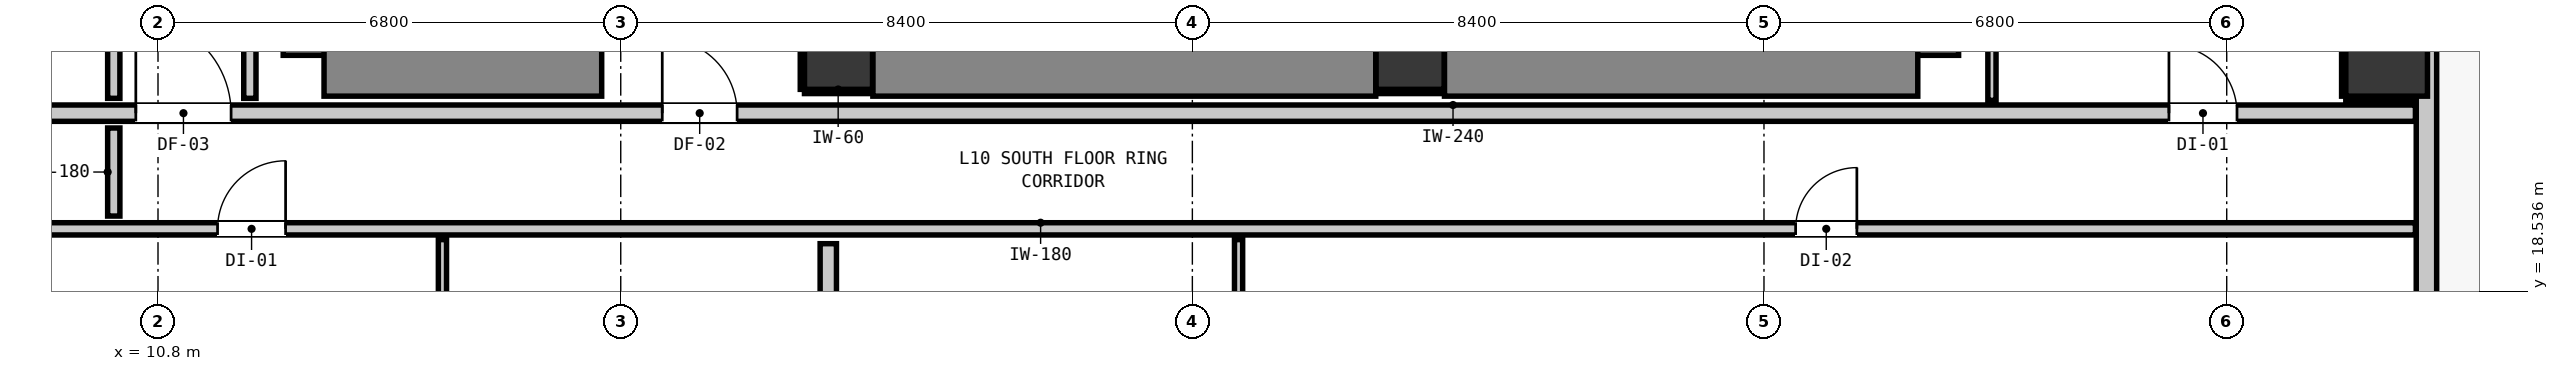
"""IFC4 building model, lengths in metres.
Left out: names, types, materials, properties, quantities, classifications, styles, units other than length and angle.
Written with IfcOpenShell. Run it as: python <this file> out.ifc"""

import sys

from ifc_helpers import new_model, si_unit, direction, frame, frame_2d, origin, origin_2d, place, context, subcontext, project, spatial, rectangle, extrude, element, fill, save


model = new_model("IFC4")
c1 = context("Model", 3, precision=1e-05, world=origin(), true_north=direction((0.0, 1.0)))
c2 = subcontext(c1, "Body", "Model", "MODEL_VIEW")
j1 = project(units=[si_unit("LENGTHUNIT", "METRE"), si_unit("PLANEANGLEUNIT", "RADIAN")], contexts=[c1])
p1 = place(None, origin())
s1 = spatial("IfcSite", under=j1, at=p1, CompositionType="ELEMENT")
p2 = place(p1, origin())
s2 = spatial("IfcBuilding", under=s1, at=p2, CompositionType="ELEMENT")
p3 = place(p2, frame((0.0, 0.0, 38.6)))
s3 = spatial("IfcBuildingStorey", under=s2, at=p3, CompositionType="ELEMENT", Elevation=38.6)
for number, where, z_axis, x_axis in (
    (1, (20.8, 22.0, 0.0), (0.0, 0.0, 1.0), (1.0, 0.0, 0.0)),
    (2, (29.2, 22.0, 0.0), (0.0, 0.0, 1.0), (1.0, 0.0, 0.0)),
):
    element("IfcColumn", number, at=place(p3, frame(where, z_axis=z_axis, x_axis=x_axis)), inside=s3, PredefinedType="COLUMN", context=c2, shape_type="SweptSolid", body=[
        extrude(rectangle(XDim=1.0, YDim=1.0, at=origin_2d()), origin(), (0.0, 0.0, 1.0), 3.32),
    ])
p4 = place(p3, frame((13.24, 22.0, 0.0), z_axis=(0.0, 0.0, 1.0), x_axis=(0.0, 1.0, 0.0)))
e3 = element("IfcWall", 3, at=p4, inside=s3, PredefinedType="SHEAR", context=c2, shape_type="SweptSolid", body=[
    extrude(rectangle(XDim=8.195, YDim=1.2, at=frame_2d((4.098, 0.0))), origin(), (0.0, 0.0, 1.0), 3.32),
])
p5 = place(p3, frame((13.24, 22.0, 0.0), z_axis=(0.0, 0.0, 1.0), x_axis=(1.0, 0.0, 0.0)))
e4 = element("IfcWall", 4, at=p5, inside=s3, PredefinedType="SHEAR", context=c2, shape_type="SweptSolid", body=[
    extrude(rectangle(XDim=4.08, YDim=1.2, at=frame_2d((2.04, 0.0))), origin(), (0.0, 0.0, 1.0), 3.32),
])
p6 = place(p3, frame((36.66, 22.0, 0.0), z_axis=(0.0, 0.0, 1.0), x_axis=(0.0, 1.0, 0.0)))
e5 = element("IfcWall", 5, at=p6, inside=s3, PredefinedType="SHEAR", context=c2, shape_type="SweptSolid", body=[
    extrude(rectangle(XDim=8.195, YDim=1.2, at=frame_2d((4.098, 0.0))), origin(), (0.0, 0.0, 1.0), 3.32),
])
p7 = place(p3, frame((29.705, 22.0, 0.0), z_axis=(0.0, 0.0, 1.0), x_axis=(1.0, 0.0, 0.0)))
e6 = element("IfcWall", 6, at=p7, inside=s3, PredefinedType="SHEAR", context=c2, shape_type="SweptSolid", body=[
    extrude(rectangle(XDim=6.955, YDim=1.2, at=frame_2d((3.478, 0.0))), origin(), (0.0, 0.0, 1.0), 3.32),
])
p8 = place(p3, frame((21.305, 22.0, 0.0), z_axis=(0.0, 0.0, 1.0), x_axis=(1.0, 0.0, 0.0)))
e7 = element("IfcWall", 7, at=p8, inside=s3, PredefinedType="SHEAR", context=c2, shape_type="SweptSolid", body=[
    extrude(rectangle(XDim=7.39, YDim=1.2, at=frame_2d((3.695, 0.0))), origin(), (0.0, 0.0, 1.0), 3.32),
])
p9 = place(p3, frame((43.55, 22.0, 0.0), z_axis=(0.0, 0.0, 1.0), x_axis=(1.0, 0.0, 0.0)))
e8 = element("IfcColumn", 8, at=p9, inside=s3, PredefinedType="COLUMN", context=c2, shape_type="SweptSolid", body=[
    extrude(rectangle(XDim=1.2, YDim=1.2, at=origin_2d()), origin(), (0.0, 0.0, 1.0), 2.9),
])
p10 = place(p3, frame((44.135, 44.835, 0.0), z_axis=(0.0, 0.0, 1.0), x_axis=(0.0, -1.0, 0.0)))
e9 = element("IfcWall", 9, at=p10, inside=s3, PredefinedType="STANDARD", context=c2, shape_type="SweptSolid", body=[
    extrude(rectangle(XDim=34.67, YDim=0.3, at=frame_2d((17.335, 0.0))), origin(), (0.0, 0.0, 1.0), 2.9),
])
p11 = place(p10, frame((1.251, 0.0, 0.0)))
e10 = element("IfcOpeningElement", 10, at=p11, cuts=e9, PredefinedType="OPENING", context=c2, shape_type="SweptSolid", body=[
    extrude(rectangle(XDim=1.0, YDim=2.15, at=frame_2d((0.5, 1.075))), frame((0.0, 0.16, 0.0), z_axis=(0.0, -1.0, 0.0), x_axis=(1.0, 0.0, 0.0)), (0.0, 0.0, 1.0), 0.32),
])
p12 = place(p10, frame((29.508, 0.0, 0.85)))
e11 = element("IfcOpeningElement", 11, at=p12, cuts=e9, PredefinedType="OPENING", context=c2, shape_type="SweptSolid", body=[
    extrude(rectangle(XDim=1.05, YDim=1.65, at=frame_2d((0.525, 0.825))), frame((0.0, 0.16, 0.0), z_axis=(0.0, -1.0, 0.0), x_axis=(1.0, 0.0, 0.0)), (0.0, 0.0, 1.0), 0.32),
])
p13 = place(p10, frame((19.619, 0.0, 0.85)))
e12 = element("IfcOpeningElement", 12, at=p13, cuts=e9, PredefinedType="OPENING", context=c2, shape_type="SweptSolid", body=[
    extrude(rectangle(XDim=1.05, YDim=1.65, at=frame_2d((0.525, 0.825))), frame((0.0, 0.16, 0.0), z_axis=(0.0, -1.0, 0.0), x_axis=(1.0, 0.0, 0.0)), (0.0, 0.0, 1.0), 0.32),
])
p14 = place(p3, frame((1.827, 21.15, 0.0), z_axis=(0.0, 0.0, 1.0), x_axis=(1.0, 0.0, 0.0)))
e13 = element("IfcWall", 13, at=p14, inside=s3, PredefinedType="PARTITIONING", context=c2, shape_type="SweptSolid", body=[
    extrude(rectangle(XDim=42.146, YDim=0.24, at=frame_2d((21.073, 0.0))), origin(), (0.0, 0.0, 1.0), 2.9),
])
p15 = place(p14, frame((16.383, 0.0, 0.0)))
e14 = element("IfcOpeningElement", 14, at=p15, cuts=e13, PredefinedType="OPENING", context=c2, shape_type="SweptSolid", body=[
    extrude(rectangle(XDim=1.1, YDim=2.15, at=frame_2d((0.55, 1.075))), frame((0.0, 0.13, 0.0), z_axis=(0.0, -1.0, 0.0), x_axis=(1.0, 0.0, 0.0)), (0.0, 0.0, 1.0), 0.26),
])
p16 = place(p14, frame((8.647, 0.0, 0.0)))
e15 = element("IfcOpeningElement", 15, at=p16, cuts=e13, PredefinedType="OPENING", context=c2, shape_type="SweptSolid", body=[
    extrude(rectangle(XDim=1.4, YDim=2.15, at=frame_2d((0.7, 1.075))), frame((0.0, 0.13, 0.0), z_axis=(0.0, -1.0, 0.0), x_axis=(1.0, 0.0, 0.0)), (0.0, 0.0, 1.0), 0.26),
])
p17 = place(p14, frame((38.524, 0.0, 0.0)))
e16 = element("IfcOpeningElement", 16, at=p17, cuts=e13, PredefinedType="OPENING", context=c2, shape_type="SweptSolid", body=[
    extrude(rectangle(XDim=1.0, YDim=2.15, at=frame_2d((0.5, 1.075))), frame((0.0, 0.13, 0.0), z_axis=(0.0, -1.0, 0.0), x_axis=(1.0, 0.0, 0.0)), (0.0, 0.0, 1.0), 0.26),
])
p18 = place(p3, frame((1.827, 19.45, 0.0), z_axis=(0.0, 0.0, 1.0), x_axis=(1.0, 0.0, 0.0)))
e17 = element("IfcWall", 17, at=p18, inside=s3, PredefinedType="PARTITIONING", context=c2, shape_type="SweptSolid", body=[
    extrude(rectangle(XDim=42.146, YDim=0.18, at=frame_2d((21.073, 0.0))), origin(), (0.0, 0.0, 1.0), 2.9),
])
p19 = place(p18, frame((9.848, 0.0, 0.0)))
e18 = element("IfcOpeningElement", 18, at=p19, cuts=e17, PredefinedType="OPENING", context=c2, shape_type="SweptSolid", body=[
    extrude(rectangle(XDim=1.0, YDim=2.15, at=frame_2d((0.5, 1.075))), frame((0.0, 0.1, 0.0), z_axis=(0.0, -1.0, 0.0), x_axis=(1.0, 0.0, 0.0)), (0.0, 0.0, 1.0), 0.2),
])
p20 = place(p18, frame((33.038, 0.0, 0.0)))
e19 = element("IfcOpeningElement", 19, at=p20, cuts=e17, PredefinedType="OPENING", context=c2, shape_type="SweptSolid", body=[
    extrude(rectangle(XDim=0.9, YDim=2.1, at=frame_2d((0.45, 1.05))), frame((0.0, 0.1, 0.0), z_axis=(0.0, -1.0, 0.0), x_axis=(1.0, 0.0, 0.0)), (0.0, 0.0, 1.0), 0.2),
])
p21 = place(p3, frame((20.65, 13.198, 0.0), z_axis=(0.0, 0.0, 1.0), x_axis=(0.0, 1.0, 0.0)))
e20 = element("IfcWall", 20, at=p21, inside=s3, PredefinedType="PARTITIONING", context=c2, shape_type="SweptSolid", body=[
    extrude(rectangle(XDim=6.034, YDim=0.24, at=frame_2d((3.017, 0.0))), origin(), (0.0, 0.0, 1.0), 0.905),
])
p22 = place(p3, frame((10.15, 19.638, 0.0), z_axis=(0.0, 0.0, 1.0), x_axis=(0.0, 1.0, 0.0)))
e21 = element("IfcWall", 21, at=p22, inside=s3, PredefinedType="PARTITIONING", context=c2, shape_type="SweptSolid", body=[
    extrude(rectangle(XDim=1.294, YDim=0.18, at=frame_2d((0.647, 0.0))), origin(), (0.0, 0.0, 1.0), 2.9),
])
p23 = place(p3, frame((10.15, 21.368, 0.0), z_axis=(0.0, 0.0, 1.0), x_axis=(0.0, 1.0, 0.0)))
e22 = element("IfcWall", 22, at=p23, inside=s3, PredefinedType="PARTITIONING", context=c2, shape_type="SweptSolid", body=[
    extrude(rectangle(XDim=11.874, YDim=0.18, at=frame_2d((5.937, 0.0))), origin(), (0.0, 0.0, 1.0), 2.9),
])
p24 = place(p23, frame((5.481, 0.0, 0.0)))
e23 = element("IfcOpeningElement", 23, at=p24, cuts=e22, PredefinedType="OPENING", context=c2, shape_type="SweptSolid", body=[
    extrude(rectangle(XDim=0.9, YDim=2.1, at=frame_2d((0.45, 1.05))), frame((0.0, 0.1, 0.0), z_axis=(0.0, -1.0, 0.0), x_axis=(1.0, 0.0, 0.0)), (0.0, 0.0, 1.0), 0.2),
])
p25 = place(p3, frame((12.15, 21.368, 0.0), z_axis=(0.0, 0.0, 1.0), x_axis=(0.0, 1.0, 0.0)))
e24 = element("IfcWall", 24, at=p25, inside=s3, PredefinedType="PARTITIONING", context=c2, shape_type="SweptSolid", body=[
    extrude(rectangle(XDim=18.694, YDim=0.18, at=frame_2d((9.347, 0.0))), origin(), (0.0, 0.0, 1.0), 2.9),
])
p26 = place(p3, frame((14.98, 13.138, 0.0), z_axis=(0.0, 0.0, 1.0), x_axis=(0.0, 1.0, 0.0)))
e25 = element("IfcWall", 25, at=p26, inside=s3, PredefinedType="PARTITIONING", context=c2, shape_type="SweptSolid", body=[
    extrude(rectangle(XDim=6.154, YDim=0.12, at=frame_2d((3.077, 0.0))), origin(), (0.0, 0.0, 1.0), 2.9),
])
p27 = place(p26, frame((2.637, 0.0, 0.0)))
e26 = element("IfcOpeningElement", 26, at=p27, cuts=e25, PredefinedType="OPENING", context=c2, shape_type="SweptSolid", body=[
    extrude(rectangle(XDim=0.9, YDim=2.1, at=frame_2d((0.45, 1.05))), frame((0.0, 0.07, 0.0), z_axis=(0.0, -1.0, 0.0), x_axis=(1.0, 0.0, 0.0)), (0.0, 0.0, 1.0), 0.14),
])
p28 = place(p3, frame((26.679, 13.138, 0.0), z_axis=(0.0, 0.0, 1.0), x_axis=(0.0, 1.0, 0.0)))
e27 = element("IfcWall", 27, at=p28, inside=s3, PredefinedType="PARTITIONING", context=c2, shape_type="SweptSolid", body=[
    extrude(rectangle(XDim=6.154, YDim=0.12, at=frame_2d((3.077, 0.0))), origin(), (0.0, 0.0, 1.0), 2.9),
])
p29 = place(p3, frame((37.75, 21.338, 0.0), z_axis=(0.0, 0.0, 1.0), x_axis=(0.0, 1.0, 0.0)))
e28 = element("IfcWall", 28, at=p29, inside=s3, PredefinedType="PARTITIONING", context=c2, shape_type="SweptSolid", body=[
    extrude(rectangle(XDim=5.316, YDim=0.12, at=frame_2d((2.658, 0.0))), origin(), (0.0, 0.0, 1.0), 2.9),
])
p30 = place(p3, frame((20.3, 21.468, 0.0), z_axis=(0.0, 0.0, 1.0), x_axis=(1.0, 0.0, 0.0)))
e29 = element("IfcWall", 29, at=p30, inside=s3, PredefinedType="PARTITIONING", context=c2, shape_type="SweptSolid", body=[
    extrude(rectangle(XDim=0.99, YDim=0.06, at=frame_2d((0.495, 0.0))), origin(), (0.0, 0.0, 1.0), 0.905),
])
p31 = place(p3, frame((20.268, 21.5, 0.0), z_axis=(0.0, 0.0, 1.0), x_axis=(0.0, 1.0, 0.0)))
e30 = element("IfcWall", 30, at=p31, inside=s3, PredefinedType="PARTITIONING", context=c2, shape_type="SweptSolid", body=[
    extrude(rectangle(XDim=1.0, YDim=0.06, at=frame_2d((0.5, 0.0))), origin(), (0.0, 0.0, 1.0), 0.905),
])
p32 = place(p3, frame((28.71, 21.468, 0.0), z_axis=(0.0, 0.0, 1.0), x_axis=(1.0, 0.0, 0.0)))
e31 = element("IfcWall", 31, at=p32, inside=s3, PredefinedType="PARTITIONING", context=c2, shape_type="SweptSolid", body=[
    extrude(rectangle(XDim=0.98, YDim=0.06, at=frame_2d((0.49, 0.0))), origin(), (0.0, 0.0, 1.0), 0.905),
])
p33 = place(p3, frame((42.95, 21.368, 0.0), z_axis=(0.0, 0.0, 1.0), x_axis=(1.0, 0.0, 0.0)))
e32 = element("IfcWall", 32, at=p33, inside=s3, PredefinedType="PARTITIONING", context=c2, shape_type="SweptSolid", body=[
    extrude(rectangle(XDim=1.02, YDim=0.06, at=frame_2d((0.51, 0.0))), origin(), (0.0, 0.0, 1.0), 0.905),
])
p34 = place(p3, frame((42.918, 21.4, 0.0), z_axis=(0.0, 0.0, 1.0), x_axis=(0.0, 1.0, 0.0)))
e33 = element("IfcWall", 33, at=p34, inside=s3, PredefinedType="PARTITIONING", context=c2, shape_type="SweptSolid", body=[
    extrude(rectangle(XDim=1.2, YDim=0.06, at=frame_2d((0.6, 0.0))), origin(), (0.0, 0.0, 1.0), 1.45),
])
p35 = place(p15, origin())
e34 = element("IfcDoor", 34, at=p35, inside=s3, OperationType="SINGLE_SWING_LEFT", PredefinedType="DOOR", context=c2, shape_type="SweptSolid", body=[
    extrude(rectangle(XDim=1.1, YDim=2.15, at=frame_2d((0.55, 1.075))), frame((0.0, 0.025, 0.0), z_axis=(0.0, -1.0, 0.0), x_axis=(1.0, 0.0, 0.0)), (0.0, 0.0, 1.0), 0.05),
])
fill(e14, e34)
p36 = place(p16, origin())
e35 = element("IfcDoor", 35, at=p36, inside=s3, OperationType="SINGLE_SWING_LEFT", PredefinedType="DOOR", context=c2, shape_type="SweptSolid", body=[
    extrude(rectangle(XDim=1.4, YDim=2.15, at=frame_2d((0.7, 1.075))), frame((0.0, 0.025, 0.0), z_axis=(0.0, -1.0, 0.0), x_axis=(1.0, 0.0, 0.0)), (0.0, 0.0, 1.0), 0.05),
])
fill(e15, e35)
p37 = place(p19, origin())
e36 = element("IfcDoor", 36, at=p37, inside=s3, OperationType="SINGLE_SWING_RIGHT", PredefinedType="DOOR", context=c2, shape_type="SweptSolid", body=[
    extrude(rectangle(XDim=1.0, YDim=2.15, at=frame_2d((0.5, 1.075))), frame((0.0, 0.025, 0.0), z_axis=(0.0, -1.0, 0.0), x_axis=(1.0, 0.0, 0.0)), (0.0, 0.0, 1.0), 0.05),
])
fill(e18, e36)
p38 = place(p20, origin())
e37 = element("IfcDoor", 37, at=p38, inside=s3, OperationType="SINGLE_SWING_RIGHT", PredefinedType="DOOR", context=c2, shape_type="SweptSolid", body=[
    extrude(rectangle(XDim=0.9, YDim=2.1, at=frame_2d((0.45, 1.05))), frame((0.0, 0.025, 0.0), z_axis=(0.0, -1.0, 0.0), x_axis=(1.0, 0.0, 0.0)), (0.0, 0.0, 1.0), 0.05),
])
fill(e19, e37)
p39 = place(p17, origin())
e38 = element("IfcDoor", 38, at=p39, inside=s3, OperationType="SINGLE_SWING_LEFT", PredefinedType="DOOR", context=c2, shape_type="SweptSolid", body=[
    extrude(rectangle(XDim=1.0, YDim=2.15, at=frame_2d((0.5, 1.075))), frame((0.0, 0.025, 0.0), z_axis=(0.0, -1.0, 0.0), x_axis=(1.0, 0.0, 0.0)), (0.0, 0.0, 1.0), 0.05),
])
fill(e16, e38)
save(model, sys.argv[1])
